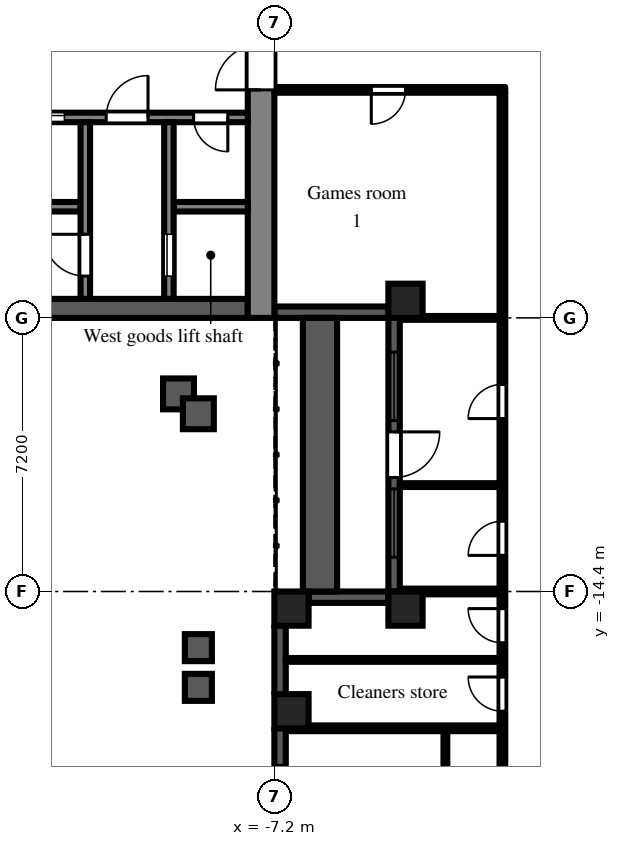
"""IFC4 building model, lengths in metres.
Left out: names, types, materials, properties, quantities, classifications, styles, units other than length and angle.
Written with IfcOpenShell. Run it as: python <this file> out.ifc"""

import sys

from ifc_helpers import new_model, si_unit, direction, frame, frame_2d, origin, origin_2d, place, context, subcontext, project, spatial, rectangle, extrude, element, fill, save


model = new_model("IFC4")
c1 = context("Model", 3, precision=1e-05, world=origin(), true_north=direction((0.0, 1.0)))
c2 = subcontext(c1, "Body", "Model", "MODEL_VIEW")
j1 = project(units=[si_unit("LENGTHUNIT", "METRE"), si_unit("PLANEANGLEUNIT", "RADIAN")], contexts=[c1])
p1 = place(None, origin())
s1 = spatial("IfcSite", under=j1, at=p1, CompositionType="ELEMENT")
p2 = place(p1, origin())
s2 = spatial("IfcBuilding", under=s1, at=p2, CompositionType="ELEMENT")
p3 = place(p2, frame((0.0, 0.0, 75.9)))
s3 = spatial("IfcBuildingStorey", under=s2, at=p3, CompositionType="ELEMENT", Elevation=75.9)
for number, where, z_axis, x_axis in (
    (1, (-6.75, -17.55, 0.0), (0.0, 0.0, 1.0), (1.0, 0.0, 0.0)),
    (2, (-6.75, -14.85, 0.0), (0.0, 0.0, 1.0), (1.0, 0.0, 0.0)),
    (3, (-3.75, -14.85, 0.0), (0.0, 0.0, 1.0), (1.0, 0.0, 0.0)),
    (4, (-3.75, -6.75, 0.0), (0.0, 0.0, 1.0), (1.0, 0.0, 0.0)),
):
    element("IfcColumn", number, at=place(p3, frame(where, z_axis=z_axis, x_axis=x_axis)), inside=s3, PredefinedType="COLUMN", context=c2, shape_type="SweptSolid", body=[
        extrude(rectangle(XDim=0.9, YDim=0.9, at=origin_2d()), origin(), (0.0, 0.0, 1.0), 3.0),
    ])
p4 = place(p3, frame((-7.2, -7.05, 0.0), z_axis=(0.0, 0.0, 1.0), x_axis=(1.0, 0.0, 0.0)))
e5 = element("IfcWall", 5, at=p4, inside=s3, PredefinedType="SOLIDWALL", context=c2, shape_type="SweptSolid", body=[
    extrude(rectangle(XDim=3.0, YDim=0.3, at=frame_2d((1.5, 0.0))), origin(), (0.0, 0.0, 1.0), 2.1),
])
p5 = place(p3, frame((-4.05, -7.2, 0.0), z_axis=(0.0, 0.0, 1.0), x_axis=(0.0, -1.0, 0.0)))
e6 = element("IfcWall", 6, at=p5, inside=s3, PredefinedType="SOLIDWALL", context=c2, shape_type="SweptSolid", body=[
    extrude(rectangle(XDim=7.2, YDim=0.3, at=frame_2d((3.6, 0.0))), origin(), (0.0, 0.0, 1.0), 2.1),
])
p6 = place(p5, frame((3.0, 0.0, 0.0)))
e7 = element("IfcOpeningElement", 7, at=p6, cuts=e6, PredefinedType="OPENING", context=c2, shape_type="SweptSolid", body=[
    extrude(rectangle(XDim=1.2, YDim=2.05, at=frame_2d((0.6, 1.025))), frame((0.0, 0.16, 0.0), z_axis=(0.0, -1.0, 0.0), x_axis=(1.0, 0.0, 0.0)), (0.0, 0.0, 1.0), 0.32),
])
p7 = place(p5, frame((0.9, 0.0, 0.2)))
e8 = element("IfcOpeningElement", 8, at=p7, cuts=e6, PredefinedType="OPENING", context=c2, shape_type="SweptSolid", body=[
    extrude(rectangle(XDim=1.8, YDim=1.85, at=frame_2d((0.9, 0.925))), frame((0.0, 0.16, 0.0), z_axis=(0.0, -1.0, 0.0), x_axis=(1.0, 0.0, 0.0)), (0.0, 0.0, 1.0), 0.32),
])
p8 = place(p5, frame((4.5, 0.0, 0.2)))
e9 = element("IfcOpeningElement", 9, at=p8, cuts=e6, PredefinedType="OPENING", context=c2, shape_type="SweptSolid", body=[
    extrude(rectangle(XDim=1.8, YDim=1.85, at=frame_2d((0.9, 0.925))), frame((0.0, 0.16, 0.0), z_axis=(0.0, -1.0, 0.0), x_axis=(1.0, 0.0, 0.0)), (0.0, 0.0, 1.0), 0.32),
])
p9 = place(p3, frame((-4.2, -14.55, 0.0), z_axis=(0.0, 0.0, 1.0), x_axis=(-1.0, 0.0, 0.0)))
e10 = element("IfcWall", 10, at=p9, inside=s3, PredefinedType="SOLIDWALL", context=c2, shape_type="SweptSolid", body=[
    extrude(rectangle(XDim=2.1, YDim=0.3, at=frame_2d((1.05, 0.0))), origin(), (0.0, 0.0, 1.0), 2.1),
])
p10 = place(p3, frame((-7.05, -15.3, 0.0), z_axis=(0.0, 0.0, 1.0), x_axis=(0.0, -1.0, 0.0)))
e11 = element("IfcWall", 11, at=p10, inside=s3, PredefinedType="SOLIDWALL", context=c2, shape_type="SweptSolid", body=[
    extrude(rectangle(XDim=1.8, YDim=0.3, at=frame_2d((0.9, 0.0))), origin(), (0.0, 0.0, 1.0), 2.1),
])
p11 = place(p3, frame((-7.05, -18.0, 0.0), z_axis=(0.0, 0.0, 1.0), x_axis=(0.0, -1.0, 0.0)))
e12 = element("IfcWall", 12, at=p11, inside=s3, PredefinedType="SOLIDWALL", context=c2, shape_type="SweptSolid", body=[
    extrude(rectangle(XDim=3.15, YDim=0.3, at=frame_2d((1.575, 0.0))), origin(), (0.0, 0.0, 1.0), 2.1),
])
p12 = place(p11, frame((0.975, 0.0, 0.2)))
e13 = element("IfcOpeningElement", 13, at=p12, cuts=e12, PredefinedType="OPENING", context=c2, shape_type="SweptSolid", body=[
    extrude(rectangle(XDim=1.2, YDim=1.85, at=frame_2d((0.6, 0.925))), frame((0.0, 0.16, 0.0), z_axis=(0.0, -1.0, 0.0), x_axis=(1.0, 0.0, 0.0)), (0.0, 0.0, 1.0), 0.32),
])
p13 = place(p3, frame((-6.0, -14.4, 0.0), z_axis=(0.0, 0.0, 1.0), x_axis=(0.0, 1.0, 0.0)))
e14 = element("IfcWall", 14, at=p13, inside=s3, PredefinedType="PARAPET", context=c2, shape_type="SweptSolid", body=[
    extrude(rectangle(XDim=7.2, YDim=0.9, at=frame_2d((3.6, 0.0))), origin(), (0.0, 0.0, 1.0), 0.8),
])
p14 = place(p3, frame((-7.55, -7.2, 0.0), z_axis=(0.0, 0.0, 1.0), x_axis=(0.0, 1.0, 0.0)))
e15 = element("IfcWall", 15, at=p14, inside=s3, PredefinedType="SHEAR", context=c2, shape_type="SweptSolid", body=[
    extrude(rectangle(XDim=14.4, YDim=0.7, at=frame_2d((7.2, 0.0))), origin(), (0.0, 0.0, 1.0), 2.575),
])
p15 = place(p14, frame((6.0, 0.0, 0.0)))
e16 = element("IfcOpeningElement", 16, at=p15, cuts=e15, PredefinedType="OPENING", context=c2, shape_type="SweptSolid", body=[
    extrude(rectangle(XDim=2.4, YDim=2.2, at=frame_2d((1.2, 1.1))), frame((0.0, 0.36, 0.0), z_axis=(0.0, -1.0, 0.0), x_axis=(1.0, 0.0, 0.0)), (0.0, 0.0, 1.0), 0.72),
])
p16 = place(p3, frame((-7.9, -6.95, 0.0), z_axis=(0.0, 0.0, 1.0), x_axis=(-1.0, 0.0, 0.0)))
e17 = element("IfcWall", 17, at=p16, inside=s3, PredefinedType="SHEAR", context=c2, shape_type="SweptSolid", body=[
    extrude(rectangle(XDim=12.95, YDim=0.5, at=frame_2d((6.475, 0.0))), origin(), (0.0, 0.0, 1.0), 2.575),
])
p17 = place(p3, frame((-7.9, -1.925, 0.0), z_axis=(0.0, 0.0, 1.0), x_axis=(-1.0, 0.0, 0.0)))
e18 = element("IfcWall", 18, at=p17, inside=s3, PredefinedType="SHEAR", context=c2, shape_type="SweptSolid", body=[
    extrude(rectangle(XDim=12.95, YDim=0.25, at=frame_2d((6.475, 0.0))), origin(), (0.0, 0.0, 1.0), 2.575),
])
p18 = place(p17, frame((4.825, 0.0, 0.0)))
e19 = element("IfcOpeningElement", 19, at=p18, cuts=e18, PredefinedType="OPENING", context=c2, shape_type="SweptSolid", body=[
    extrude(rectangle(XDim=1.1, YDim=2.1, at=frame_2d((0.55, 1.05))), frame((0.0, 0.135, 0.0), z_axis=(0.0, -1.0, 0.0), x_axis=(1.0, 0.0, 0.0)), (0.0, 0.0, 1.0), 0.27),
])
p19 = place(p17, frame((7.025, 0.0, 0.0)))
e20 = element("IfcOpeningElement", 20, at=p19, cuts=e18, PredefinedType="OPENING", context=c2, shape_type="SweptSolid", body=[
    extrude(rectangle(XDim=1.1, YDim=2.1, at=frame_2d((0.55, 1.05))), frame((0.0, 0.135, 0.0), z_axis=(0.0, -1.0, 0.0), x_axis=(1.0, 0.0, 0.0)), (0.0, 0.0, 1.0), 0.27),
])
p20 = place(p17, frame((9.225, 0.0, 0.0)))
e21 = element("IfcOpeningElement", 21, at=p20, cuts=e18, PredefinedType="OPENING", context=c2, shape_type="SweptSolid", body=[
    extrude(rectangle(XDim=1.1, YDim=2.1, at=frame_2d((0.55, 1.05))), frame((0.0, 0.135, 0.0), z_axis=(0.0, -1.0, 0.0), x_axis=(1.0, 0.0, 0.0)), (0.0, 0.0, 1.0), 0.27),
])
p21 = place(p17, frame((0.525, 0.0, 0.0)))
e22 = element("IfcOpeningElement", 22, at=p21, cuts=e18, PredefinedType="OPENING", context=c2, shape_type="SweptSolid", body=[
    extrude(rectangle(XDim=0.9, YDim=2.1, at=frame_2d((0.45, 1.05))), frame((0.0, 0.135, 0.0), z_axis=(0.0, -1.0, 0.0), x_axis=(1.0, 0.0, 0.0)), (0.0, 0.0, 1.0), 0.27),
])
p22 = place(p17, frame((2.625, 0.0, 0.0)))
e23 = element("IfcOpeningElement", 23, at=p22, cuts=e18, PredefinedType="OPENING", context=c2, shape_type="SweptSolid", body=[
    extrude(rectangle(XDim=1.1, YDim=2.1, at=frame_2d((0.55, 1.05))), frame((0.0, 0.135, 0.0), z_axis=(0.0, -1.0, 0.0), x_axis=(1.0, 0.0, 0.0)), (0.0, 0.0, 1.0), 0.27),
])
p23 = place(p3, frame((-7.9, -4.275, 0.0), z_axis=(0.0, 0.0, 1.0), x_axis=(-1.0, 0.0, 0.0)))
e24 = element("IfcWall", 24, at=p23, inside=s3, PredefinedType="SHEAR", context=c2, shape_type="SweptSolid", body=[
    extrude(rectangle(XDim=1.95, YDim=0.25, at=frame_2d((0.975, 0.0))), origin(), (0.0, 0.0, 1.0), 2.575),
])
p24 = place(p3, frame((-12.3, -4.275, 0.0), z_axis=(0.0, 0.0, 1.0), x_axis=(-1.0, 0.0, 0.0)))
e25 = element("IfcWall", 25, at=p24, inside=s3, PredefinedType="SHEAR", context=c2, shape_type="SweptSolid", body=[
    extrude(rectangle(XDim=8.55, YDim=0.25, at=frame_2d((4.275, 0.0))), origin(), (0.0, 0.0, 1.0), 2.575),
])
p25 = place(p3, frame((-9.975, -2.05, 0.0), z_axis=(0.0, 0.0, 1.0), x_axis=(0.0, -1.0, 0.0)))
e26 = element("IfcWall", 26, at=p25, inside=s3, PredefinedType="SHEAR", context=c2, shape_type="SweptSolid", body=[
    extrude(rectangle(XDim=4.65, YDim=0.25, at=frame_2d((2.325, 0.0))), origin(), (0.0, 0.0, 1.0), 2.575),
])
p26 = place(p25, frame((2.95, 0.0, 0.0)))
e27 = element("IfcOpeningElement", 27, at=p26, cuts=e26, PredefinedType="OPENING", context=c2, shape_type="SweptSolid", body=[
    extrude(rectangle(XDim=1.1, YDim=2.1, at=frame_2d((0.55, 1.05))), frame((0.0, 0.135, 0.0), z_axis=(0.0, -1.0, 0.0), x_axis=(1.0, 0.0, 0.0)), (0.0, 0.0, 1.0), 0.27),
])
p27 = place(p3, frame((-12.175, -2.05, 0.0), z_axis=(0.0, 0.0, 1.0), x_axis=(0.0, -1.0, 0.0)))
e28 = element("IfcWall", 28, at=p27, inside=s3, PredefinedType="SHEAR", context=c2, shape_type="SweptSolid", body=[
    extrude(rectangle(XDim=4.65, YDim=0.25, at=frame_2d((2.325, 0.0))), origin(), (0.0, 0.0, 1.0), 2.575),
])
p28 = place(p27, frame((2.95, 0.0, 0.0)))
e29 = element("IfcOpeningElement", 29, at=p28, cuts=e28, PredefinedType="OPENING", context=c2, shape_type="SweptSolid", body=[
    extrude(rectangle(XDim=1.1, YDim=2.1, at=frame_2d((0.55, 1.05))), frame((0.0, 0.135, 0.0), z_axis=(0.0, -1.0, 0.0), x_axis=(1.0, 0.0, 0.0)), (0.0, 0.0, 1.0), 0.27),
])
p29 = place(p3, frame((-7.2, -1.2, 0.0), z_axis=(0.0, 0.0, 1.0), x_axis=(1.0, 0.0, 0.0)))
e30 = element("IfcWall", 30, at=p29, inside=s3, PredefinedType="PARTITIONING", context=c2, shape_type="SweptSolid", body=[
    extrude(rectangle(XDim=6.075, YDim=0.15, at=frame_2d((3.038, 0.0))), origin(), (0.0, 0.0, 1.0), 2.575),
])
p30 = place(p29, frame((2.55, 0.0, 0.0)))
e31 = element("IfcOpeningElement", 31, at=p30, cuts=e30, PredefinedType="OPENING", context=c2, shape_type="SweptSolid", body=[
    extrude(rectangle(XDim=0.9, YDim=2.1, at=frame_2d((0.45, 1.05))), frame((0.0, 0.085, 0.0), z_axis=(0.0, -1.0, 0.0), x_axis=(1.0, 0.0, 0.0)), (0.0, 0.0, 1.0), 0.17),
])
p31 = place(p3, frame((-6.9, -18.0, 0.0), z_axis=(0.0, 0.0, 1.0), x_axis=(1.0, 0.0, 0.0)))
e32 = element("IfcWall", 32, at=p31, inside=s3, PredefinedType="PARTITIONING", context=c2, shape_type="SweptSolid", body=[
    extrude(rectangle(XDim=5.625, YDim=0.15, at=frame_2d((2.812, 0.0))), origin(), (0.0, 0.0, 1.0), 2.575),
])
p32 = place(p3, frame((-6.9, -16.2, 0.0), z_axis=(0.0, 0.0, 1.0), x_axis=(1.0, 0.0, 0.0)))
e33 = element("IfcWall", 33, at=p32, inside=s3, PredefinedType="PARTITIONING", context=c2, shape_type="SweptSolid", body=[
    extrude(rectangle(XDim=5.625, YDim=0.1, at=frame_2d((2.812, 0.0))), origin(), (0.0, 0.0, 1.0), 2.575),
])
p33 = place(p3, frame((-3.9, -14.4, 0.0), z_axis=(0.0, 0.0, 1.0), x_axis=(1.0, 0.0, 0.0)))
e34 = element("IfcWall", 34, at=p33, inside=s3, PredefinedType="PARTITIONING", context=c2, shape_type="SweptSolid", body=[
    extrude(rectangle(XDim=2.625, YDim=0.15, at=frame_2d((1.312, 0.0))), origin(), (0.0, 0.0, 1.0), 2.575),
])
for number, where, z_axis, x_axis in (
    (35, (-3.9, -11.6, 0.0), (0.0, 0.0, 1.0), (1.0, 0.0, 0.0)),
    (36, (-3.9, -7.2, 0.0), (0.0, 0.0, 1.0), (1.0, 0.0, 0.0)),
):
    element("IfcWall", number, at=place(p3, frame(where, z_axis=z_axis, x_axis=x_axis)), inside=s3, PredefinedType="PARTITIONING", context=c2, shape_type="SweptSolid", body=[
        extrude(rectangle(XDim=2.625, YDim=0.1, at=frame_2d((1.312, 0.0))), origin(), (0.0, 0.0, 1.0), 2.575),
    ])
p34 = place(p3, frame((-2.7, -32.35, 0.0), z_axis=(0.0, 0.0, 1.0), x_axis=(0.0, 1.0, 0.0)))
e37 = element("IfcWall", 37, at=p34, inside=s3, PredefinedType="PARTITIONING", context=c2, shape_type="SweptSolid", body=[
    extrude(rectangle(XDim=14.275, YDim=0.1, at=frame_2d((7.138, 0.0))), origin(), (0.0, 0.0, 1.0), 2.575),
])
p35 = place(p34, frame((3.28, 0.0, 0.0)))
e38 = element("IfcOpeningElement", 38, at=p35, cuts=e37, PredefinedType="OPENING", context=c2, shape_type="SweptSolid", body=[
    extrude(rectangle(XDim=0.9, YDim=2.1, at=frame_2d((0.45, 1.05))), frame((0.0, 0.06, 0.0), z_axis=(0.0, -1.0, 0.0), x_axis=(1.0, 0.0, 0.0)), (0.0, 0.0, 1.0), 0.12),
])
p36 = place(p34, frame((10.12, 0.0, 0.0)))
e39 = element("IfcOpeningElement", 39, at=p36, cuts=e37, PredefinedType="OPENING", context=c2, shape_type="SweptSolid", body=[
    extrude(rectangle(XDim=0.9, YDim=2.1, at=frame_2d((0.45, 1.05))), frame((0.0, 0.06, 0.0), z_axis=(0.0, -1.0, 0.0), x_axis=(1.0, 0.0, 0.0)), (0.0, 0.0, 1.0), 0.12),
])
p37 = place(p3, frame((-1.2, -36.5, 0.0), z_axis=(0.0, 0.0, 1.0), x_axis=(0.0, 1.0, 0.0)))
e40 = element("IfcWall", 40, at=p37, inside=s3, PredefinedType="PARTITIONING", context=c2, shape_type="SweptSolid", body=[
    extrude(rectangle(XDim=35.225, YDim=0.15, at=frame_2d((17.613, 0.0))), origin(), (0.0, 0.0, 1.0), 2.575),
])
p38 = place(p37, frame((23.05, 0.0, 0.0)))
e41 = element("IfcOpeningElement", 41, at=p38, cuts=e40, PredefinedType="OPENING", context=c2, shape_type="SweptSolid", body=[
    extrude(rectangle(XDim=0.9, YDim=2.1, at=frame_2d((0.45, 1.05))), frame((0.0, 0.085, 0.0), z_axis=(0.0, -1.0, 0.0), x_axis=(1.0, 0.0, 0.0)), (0.0, 0.0, 1.0), 0.17),
])
p39 = place(p37, frame((26.65, 0.0, 0.0)))
e42 = element("IfcOpeningElement", 42, at=p39, cuts=e40, PredefinedType="OPENING", context=c2, shape_type="SweptSolid", body=[
    extrude(rectangle(XDim=0.9, YDim=2.1, at=frame_2d((0.45, 1.05))), frame((0.0, 0.085, 0.0), z_axis=(0.0, -1.0, 0.0), x_axis=(1.0, 0.0, 0.0)), (0.0, 0.0, 1.0), 0.17),
])
p40 = place(p37, frame((20.75, 0.0, 0.0)))
e43 = element("IfcOpeningElement", 43, at=p40, cuts=e40, PredefinedType="OPENING", context=c2, shape_type="SweptSolid", body=[
    extrude(rectangle(XDim=0.9, YDim=2.1, at=frame_2d((0.45, 1.05))), frame((0.0, 0.085, 0.0), z_axis=(0.0, -1.0, 0.0), x_axis=(1.0, 0.0, 0.0)), (0.0, 0.0, 1.0), 0.17),
])
p41 = place(p37, frame((18.95, 0.0, 0.0)))
e44 = element("IfcOpeningElement", 44, at=p41, cuts=e40, PredefinedType="OPENING", context=c2, shape_type="SweptSolid", body=[
    extrude(rectangle(XDim=0.9, YDim=2.1, at=frame_2d((0.45, 1.05))), frame((0.0, 0.085, 0.0), z_axis=(0.0, -1.0, 0.0), x_axis=(1.0, 0.0, 0.0)), (0.0, 0.0, 1.0), 0.17),
])
p42 = place(p37, frame((1.55, 0.0, 0.0)))
e45 = element("IfcOpeningElement", 45, at=p42, cuts=e40, PredefinedType="OPENING", context=c2, shape_type="SweptSolid", body=[
    extrude(rectangle(XDim=1.0, YDim=2.1, at=frame_2d((0.5, 1.05))), frame((0.0, 0.085, 0.0), z_axis=(0.0, -1.0, 0.0), x_axis=(1.0, 0.0, 0.0)), (0.0, 0.0, 1.0), 0.17),
])
p43 = place(p6, origin())
e46 = element("IfcDoor", 46, at=p43, inside=s3, OperationType="SINGLE_SWING_LEFT", PredefinedType="DOOR", context=c2, shape_type="SweptSolid", body=[
    extrude(rectangle(XDim=1.2, YDim=2.05, at=frame_2d((0.6, 1.025))), frame((0.0, 0.025, 0.0), z_axis=(0.0, -1.0, 0.0), x_axis=(1.0, 0.0, 0.0)), (0.0, 0.0, 1.0), 0.05),
])
fill(e7, e46)
p44 = place(p7, origin())
e47 = element("IfcWindow", 47, at=p44, inside=s3, PartitioningType="SINGLE_PANEL", PredefinedType="WINDOW", context=c2, shape_type="SweptSolid", body=[
    extrude(rectangle(XDim=1.8, YDim=1.85, at=frame_2d((0.9, 0.925))), frame((0.0, 0.03, 0.0), z_axis=(0.0, -1.0, 0.0), x_axis=(1.0, 0.0, 0.0)), (0.0, 0.0, 1.0), 0.06),
])
fill(e8, e47)
p45 = place(p8, origin())
e48 = element("IfcWindow", 48, at=p45, inside=s3, PartitioningType="SINGLE_PANEL", PredefinedType="WINDOW", context=c2, shape_type="SweptSolid", body=[
    extrude(rectangle(XDim=1.8, YDim=1.85, at=frame_2d((0.9, 0.925))), frame((0.0, 0.03, 0.0), z_axis=(0.0, -1.0, 0.0), x_axis=(1.0, 0.0, 0.0)), (0.0, 0.0, 1.0), 0.06),
])
fill(e9, e48)
p46 = place(p12, origin())
e49 = element("IfcWindow", 49, at=p46, inside=s3, PartitioningType="SINGLE_PANEL", PredefinedType="WINDOW", context=c2, shape_type="SweptSolid", body=[
    extrude(rectangle(XDim=1.2, YDim=1.85, at=frame_2d((0.6, 0.925))), frame((0.0, 0.03, 0.0), z_axis=(0.0, -1.0, 0.0), x_axis=(1.0, 0.0, 0.0)), (0.0, 0.0, 1.0), 0.06),
])
fill(e13, e49)
p47 = place(p18, origin())
e50 = element("IfcDoor", 50, at=p47, inside=s3, OperationType="SLIDING_TO_LEFT", PredefinedType="DOOR", context=c2, shape_type="SweptSolid", body=[
    extrude(rectangle(XDim=1.1, YDim=2.1, at=frame_2d((0.55, 1.05))), frame((0.0, 0.025, 0.0), z_axis=(0.0, -1.0, 0.0), x_axis=(1.0, 0.0, 0.0)), (0.0, 0.0, 1.0), 0.05),
])
fill(e19, e50)
p48 = place(p26, origin())
e51 = element("IfcDoor", 51, at=p48, inside=s3, OperationType="SLIDING_TO_LEFT", PredefinedType="DOOR", context=c2, shape_type="SweptSolid", body=[
    extrude(rectangle(XDim=1.1, YDim=2.1, at=frame_2d((0.55, 1.05))), frame((0.0, 0.025, 0.0), z_axis=(0.0, -1.0, 0.0), x_axis=(1.0, 0.0, 0.0)), (0.0, 0.0, 1.0), 0.05),
])
fill(e27, e51)
p49 = place(p28, frame((1.1, 0.0, 0.0), z_axis=(0.0, 0.0, 1.0), x_axis=(-1.0, 0.0, 0.0)))
e52 = element("IfcDoor", 52, at=p49, inside=s3, OperationType="SINGLE_SWING_RIGHT", PredefinedType="DOOR", context=c2, shape_type="SweptSolid", body=[
    extrude(rectangle(XDim=1.1, YDim=2.1, at=frame_2d((0.55, 1.05))), frame((0.0, 0.025, 0.0), z_axis=(0.0, -1.0, 0.0), x_axis=(1.0, 0.0, 0.0)), (0.0, 0.0, 1.0), 0.05),
])
fill(e29, e52)
p50 = place(p21, origin())
e53 = element("IfcDoor", 53, at=p50, inside=s3, OperationType="SINGLE_SWING_LEFT", PredefinedType="DOOR", context=c2, shape_type="SweptSolid", body=[
    extrude(rectangle(XDim=0.9, YDim=2.1, at=frame_2d((0.45, 1.05))), frame((0.0, 0.025, 0.0), z_axis=(0.0, -1.0, 0.0), x_axis=(1.0, 0.0, 0.0)), (0.0, 0.0, 1.0), 0.05),
])
fill(e22, e53)
p51 = place(p22, frame((1.1, 0.0, 0.0), z_axis=(0.0, 0.0, 1.0), x_axis=(-1.0, 0.0, 0.0)))
e54 = element("IfcDoor", 54, at=p51, inside=s3, OperationType="SINGLE_SWING_RIGHT", PredefinedType="DOOR", context=c2, shape_type="SweptSolid", body=[
    extrude(rectangle(XDim=1.1, YDim=2.1, at=frame_2d((0.55, 1.05))), frame((0.0, 0.025, 0.0), z_axis=(0.0, -1.0, 0.0), x_axis=(1.0, 0.0, 0.0)), (0.0, 0.0, 1.0), 0.05),
])
fill(e23, e54)
p52 = place(p15, origin())
e55 = element("IfcDoor", 55, at=p52, inside=s3, OperationType="DOUBLE_DOOR_DOUBLE_SWING", PredefinedType="DOOR", context=c2, shape_type="SweptSolid", body=[
    extrude(rectangle(XDim=2.4, YDim=2.2, at=frame_2d((1.2, 1.1))), frame((0.0, 0.025, 0.0), z_axis=(0.0, -1.0, 0.0), x_axis=(1.0, 0.0, 0.0)), (0.0, 0.0, 1.0), 0.05),
])
fill(e16, e55)
p53 = place(p30, frame((0.9, 0.0, 0.0), z_axis=(0.0, 0.0, 1.0), x_axis=(-1.0, 0.0, 0.0)))
e56 = element("IfcDoor", 56, at=p53, inside=s3, OperationType="SINGLE_SWING_RIGHT", PredefinedType="DOOR", context=c2, shape_type="SweptSolid", body=[
    extrude(rectangle(XDim=0.9, YDim=2.1, at=frame_2d((0.45, 1.05))), frame((0.0, 0.025, 0.0), z_axis=(0.0, -1.0, 0.0), x_axis=(1.0, 0.0, 0.0)), (0.0, 0.0, 1.0), 0.05),
])
fill(e31, e56)
p54 = place(p38, origin())
e57 = element("IfcDoor", 57, at=p54, inside=s3, OperationType="SINGLE_SWING_LEFT", PredefinedType="DOOR", context=c2, shape_type="SweptSolid", body=[
    extrude(rectangle(XDim=0.9, YDim=2.1, at=frame_2d((0.45, 1.05))), frame((0.0, 0.025, 0.0), z_axis=(0.0, -1.0, 0.0), x_axis=(1.0, 0.0, 0.0)), (0.0, 0.0, 1.0), 0.05),
])
fill(e41, e57)
p55 = place(p39, origin())
e58 = element("IfcDoor", 58, at=p55, inside=s3, OperationType="SINGLE_SWING_LEFT", PredefinedType="DOOR", context=c2, shape_type="SweptSolid", body=[
    extrude(rectangle(XDim=0.9, YDim=2.1, at=frame_2d((0.45, 1.05))), frame((0.0, 0.025, 0.0), z_axis=(0.0, -1.0, 0.0), x_axis=(1.0, 0.0, 0.0)), (0.0, 0.0, 1.0), 0.05),
])
fill(e42, e58)
p56 = place(p40, origin())
e59 = element("IfcDoor", 59, at=p56, inside=s3, OperationType="SINGLE_SWING_RIGHT", PredefinedType="DOOR", context=c2, shape_type="SweptSolid", body=[
    extrude(rectangle(XDim=0.9, YDim=2.1, at=frame_2d((0.45, 1.05))), frame((0.0, 0.025, 0.0), z_axis=(0.0, -1.0, 0.0), x_axis=(1.0, 0.0, 0.0)), (0.0, 0.0, 1.0), 0.05),
])
fill(e43, e59)
p57 = place(p41, origin())
e60 = element("IfcDoor", 60, at=p57, inside=s3, OperationType="SINGLE_SWING_RIGHT", PredefinedType="DOOR", context=c2, shape_type="SweptSolid", body=[
    extrude(rectangle(XDim=0.9, YDim=2.1, at=frame_2d((0.45, 1.05))), frame((0.0, 0.025, 0.0), z_axis=(0.0, -1.0, 0.0), x_axis=(1.0, 0.0, 0.0)), (0.0, 0.0, 1.0), 0.05),
])
fill(e44, e60)
save(model, sys.argv[1])
